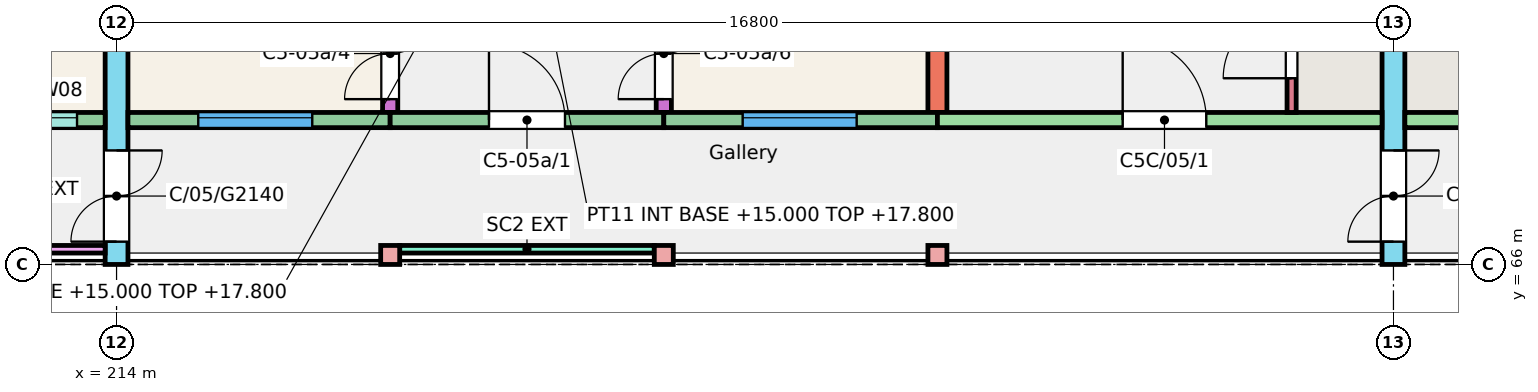
"""IFC4 building model, lengths in metres.
Left out: names, types, materials, properties, quantities, classifications, styles, units other than length and angle.
Written with IfcOpenShell. Run it as: python <this file> out.ifc"""

import sys

from ifc_helpers import new_model, si_unit, direction, frame, frame_2d, origin, origin_2d, place, context, subcontext, project, spatial, rectangle, extrude, element, fill, save


model = new_model("IFC4")
c1 = context("Model", 3, precision=1e-05, world=origin(), true_north=direction((0.0, 1.0)))
c2 = subcontext(c1, "Body", "Model", "MODEL_VIEW")
j1 = project(units=[si_unit("LENGTHUNIT", "METRE"), si_unit("PLANEANGLEUNIT", "RADIAN")], contexts=[c1])
p1 = place(None, origin())
s1 = spatial("IfcSite", under=j1, at=p1, CompositionType="ELEMENT")
p2 = place(p1, origin())
s2 = spatial("IfcBuilding", under=s1, at=p2, CompositionType="ELEMENT")
p3 = place(p2, frame((0.0, 0.0, 15.0)))
s3 = spatial("IfcBuildingStorey", under=s2, at=p3, CompositionType="ELEMENT", Elevation=15.0)
p4 = place(p3, frame((214.0, 66.0, 0.0), z_axis=(0.0, 0.0, 1.0), x_axis=(0.0, 1.0, 0.0)))
e1 = element("IfcWall", 1, at=p4, inside=s3, PredefinedType="SHEAR", context=c2, shape_type="SweptSolid", body=[
    extrude(rectangle(XDim=11.0, YDim=0.3, at=frame_2d((5.5, 0.0))), origin(), (0.0, 0.0, 1.0), 3.0),
])
p5 = place(p4, frame((0.3, 0.0, 0.0)))
e2 = element("IfcOpeningElement", 2, at=p5, cuts=e1, PredefinedType="OPENING", context=c2, shape_type="SweptSolid", body=[
    extrude(rectangle(XDim=1.2, YDim=2.1, at=frame_2d((0.6, 1.05))), frame((0.0, 0.16, 0.0), z_axis=(0.0, -1.0, 0.0), x_axis=(1.0, 0.0, 0.0)), (0.0, 0.0, 1.0), 0.32),
])
p6 = place(p3, frame((217.6, 68.0, 0.0), z_axis=(0.0, 0.0, 1.0), x_axis=(0.0, 1.0, 0.0)))
e3 = element("IfcWall", 3, at=p6, inside=s3, PredefinedType="SHEAR", context=c2, shape_type="SweptSolid", body=[
    extrude(rectangle(XDim=9.0, YDim=0.2, at=frame_2d((4.5, 0.0))), origin(), (0.0, 0.0, 1.0), 3.0),
])
p7 = place(p6, frame((0.175, 0.0, 0.0)))
e4 = element("IfcOpeningElement", 4, at=p7, cuts=e3, PredefinedType="OPENING", context=c2, shape_type="SweptSolid", body=[
    extrude(rectangle(XDim=1.2, YDim=2.1, at=frame_2d((0.6, 1.05))), frame((0.0, 0.11, 0.0), z_axis=(0.0, -1.0, 0.0), x_axis=(1.0, 0.0, 0.0)), (0.0, 0.0, 1.0), 0.22),
])
p8 = place(p6, frame((6.4, 0.0, 0.0)))
e5 = element("IfcOpeningElement", 5, at=p8, cuts=e3, PredefinedType="OPENING", context=c2, shape_type="SweptSolid", body=[
    extrude(rectangle(XDim=1.2, YDim=2.1, at=frame_2d((0.6, 1.05))), frame((0.0, 0.11, 0.0), z_axis=(0.0, -1.0, 0.0), x_axis=(1.0, 0.0, 0.0)), (0.0, 0.0, 1.0), 0.22),
])
p9 = place(p3, frame((221.2, 68.0, 0.0), z_axis=(0.0, 0.0, 1.0), x_axis=(0.0, 1.0, 0.0)))
e6 = element("IfcWall", 6, at=p9, inside=s3, PredefinedType="SHEAR", context=c2, shape_type="SweptSolid", body=[
    extrude(rectangle(XDim=9.0, YDim=0.2, at=frame_2d((4.5, 0.0))), origin(), (0.0, 0.0, 1.0), 3.0),
])
p10 = place(p9, frame((0.175, 0.0, 0.0)))
e7 = element("IfcOpeningElement", 7, at=p10, cuts=e6, PredefinedType="OPENING", context=c2, shape_type="SweptSolid", body=[
    extrude(rectangle(XDim=1.2, YDim=2.1, at=frame_2d((0.6, 1.05))), frame((0.0, 0.11, 0.0), z_axis=(0.0, -1.0, 0.0), x_axis=(1.0, 0.0, 0.0)), (0.0, 0.0, 1.0), 0.22),
])
p11 = place(p9, frame((6.4, 0.0, 0.0)))
e8 = element("IfcOpeningElement", 8, at=p11, cuts=e6, PredefinedType="OPENING", context=c2, shape_type="SweptSolid", body=[
    extrude(rectangle(XDim=1.2, YDim=2.1, at=frame_2d((0.6, 1.05))), frame((0.0, 0.11, 0.0), z_axis=(0.0, -1.0, 0.0), x_axis=(1.0, 0.0, 0.0)), (0.0, 0.0, 1.0), 0.22),
])
p12 = place(p3, frame((224.8, 68.0, 0.0), z_axis=(0.0, 0.0, 1.0), x_axis=(0.0, 1.0, 0.0)))
e9 = element("IfcWall", 9, at=p12, inside=s3, PredefinedType="SHEAR", context=c2, shape_type="SweptSolid", body=[
    extrude(rectangle(XDim=9.0, YDim=0.25, at=frame_2d((4.5, 0.0))), origin(), (0.0, 0.0, 1.0), 3.0),
])
p13 = place(p3, frame((230.8, 66.0, 0.0), z_axis=(0.0, 0.0, 1.0), x_axis=(0.0, 1.0, 0.0)))
e10 = element("IfcWall", 10, at=p13, inside=s3, PredefinedType="SHEAR", context=c2, shape_type="SweptSolid", body=[
    extrude(rectangle(XDim=11.0, YDim=0.3, at=frame_2d((5.5, 0.0))), origin(), (0.0, 0.0, 1.0), 3.0),
])
p14 = place(p13, frame((0.3, 0.0, 0.0)))
e11 = element("IfcOpeningElement", 11, at=p14, cuts=e10, PredefinedType="OPENING", context=c2, shape_type="SweptSolid", body=[
    extrude(rectangle(XDim=1.2, YDim=2.1, at=frame_2d((0.6, 1.05))), frame((0.0, 0.16, 0.0), z_axis=(0.0, -1.0, 0.0), x_axis=(1.0, 0.0, 0.0)), (0.0, 0.0, 1.0), 0.32),
])
p15 = place(p3, frame((210.4, 67.9, 0.0), z_axis=(0.0, 0.0, 1.0), x_axis=(1.0, 0.0, 0.0)))
e12 = element("IfcWall", 12, at=p15, inside=s3, PredefinedType="SOLIDWALL", context=c2, shape_type="SweptSolid", body=[
    extrude(rectangle(XDim=3.45, YDim=0.2, at=frame_2d((1.725, 0.0))), origin(), (0.0, 0.0, 1.0), 3.0),
])
p16 = place(p15, frame((1.88, 0.0, 1.1)))
e13 = element("IfcOpeningElement", 13, at=p16, cuts=e12, PredefinedType="OPENING", context=c2, shape_type="SweptSolid", body=[
    extrude(rectangle(XDim=1.2, YDim=1.3, at=frame_2d((0.6, 0.65))), frame((0.0, 0.11, 0.0), z_axis=(0.0, -1.0, 0.0), x_axis=(1.0, 0.0, 0.0)), (0.0, 0.0, 1.0), 0.22),
])
p17 = place(p15, frame((0.25, 0.0, 0.0)))
e14 = element("IfcOpeningElement", 14, at=p17, cuts=e12, PredefinedType="OPENING", context=c2, shape_type="SweptSolid", body=[
    extrude(rectangle(XDim=1.0, YDim=2.1, at=frame_2d((0.5, 1.05))), frame((0.0, 0.11, 0.0), z_axis=(0.0, -1.0, 0.0), x_axis=(1.0, 0.0, 0.0)), (0.0, 0.0, 1.0), 0.22),
])
p18 = place(p3, frame((214.15, 67.9, 0.0), z_axis=(0.0, 0.0, 1.0), x_axis=(1.0, 0.0, 0.0)))
e15 = element("IfcWall", 15, at=p18, inside=s3, PredefinedType="SOLIDWALL", context=c2, shape_type="SweptSolid", body=[
    extrude(rectangle(XDim=3.45, YDim=0.2, at=frame_2d((1.725, 0.0))), origin(), (0.0, 0.0, 1.0), 3.0),
])
p19 = place(p18, frame((0.925, 0.0, 0.9)))
e16 = element("IfcOpeningElement", 16, at=p19, cuts=e15, PredefinedType="OPENING", context=c2, shape_type="SweptSolid", body=[
    extrude(rectangle(XDim=1.5, YDim=1.5, at=frame_2d((0.75, 0.75))), frame((0.0, 0.11, 0.0), z_axis=(0.0, -1.0, 0.0), x_axis=(1.0, 0.0, 0.0)), (0.0, 0.0, 1.0), 0.22),
])
p20 = place(p3, frame((217.6, 67.9, 0.0), z_axis=(0.0, 0.0, 1.0), x_axis=(1.0, 0.0, 0.0)))
e17 = element("IfcWall", 17, at=p20, inside=s3, PredefinedType="SOLIDWALL", context=c2, shape_type="SweptSolid", body=[
    extrude(rectangle(XDim=3.6, YDim=0.2, at=frame_2d((1.8, 0.0))), origin(), (0.0, 0.0, 1.0), 3.0),
])
p21 = place(p20, frame((1.3, 0.0, 0.0)))
e18 = element("IfcOpeningElement", 18, at=p21, cuts=e17, PredefinedType="OPENING", context=c2, shape_type="SweptSolid", body=[
    extrude(rectangle(XDim=1.0, YDim=2.1, at=frame_2d((0.5, 1.05))), frame((0.0, 0.11, 0.0), z_axis=(0.0, -1.0, 0.0), x_axis=(1.0, 0.0, 0.0)), (0.0, 0.0, 1.0), 0.22),
])
p22 = place(p3, frame((221.2, 67.9, 0.0), z_axis=(0.0, 0.0, 1.0), x_axis=(1.0, 0.0, 0.0)))
e19 = element("IfcWall", 19, at=p22, inside=s3, PredefinedType="SOLIDWALL", context=c2, shape_type="SweptSolid", body=[
    extrude(rectangle(XDim=3.6, YDim=0.2, at=frame_2d((1.8, 0.0))), origin(), (0.0, 0.0, 1.0), 3.0),
])
p23 = place(p22, frame((1.038, 0.0, 0.9)))
e20 = element("IfcOpeningElement", 20, at=p23, cuts=e19, PredefinedType="OPENING", context=c2, shape_type="SweptSolid", body=[
    extrude(rectangle(XDim=1.5, YDim=1.5, at=frame_2d((0.75, 0.75))), frame((0.0, 0.11, 0.0), z_axis=(0.0, -1.0, 0.0), x_axis=(1.0, 0.0, 0.0)), (0.0, 0.0, 1.0), 0.22),
])
p24 = place(p3, frame((224.8, 67.9, 0.0), z_axis=(0.0, 0.0, 1.0), x_axis=(1.0, 0.0, 0.0)))
e21 = element("IfcWall", 21, at=p24, inside=s3, PredefinedType="SHEAR", context=c2, shape_type="SweptSolid", body=[
    extrude(rectangle(XDim=5.85, YDim=0.2, at=frame_2d((2.925, 0.0))), origin(), (0.0, 0.0, 1.0), 3.0),
])
p25 = place(p24, frame((2.438, 0.0, 0.0)))
e22 = element("IfcOpeningElement", 22, at=p25, cuts=e21, PredefinedType="OPENING", context=c2, shape_type="SweptSolid", body=[
    extrude(rectangle(XDim=1.1, YDim=2.1, at=frame_2d((0.55, 1.05))), frame((0.0, 0.11, 0.0), z_axis=(0.0, -1.0, 0.0), x_axis=(1.0, 0.0, 0.0)), (0.0, 0.0, 1.0), 0.22),
])
p26 = place(p3, frame((229.46, 68.0, 0.0), z_axis=(0.0, 0.0, 1.0), x_axis=(0.0, 1.0, 0.0)))
e23 = element("IfcWall", 23, at=p26, inside=s3, PredefinedType="SHEAR", context=c2, shape_type="SweptSolid", body=[
    extrude(rectangle(XDim=1.72, YDim=0.12, at=frame_2d((0.86, 0.0))), origin(), (0.0, 0.0, 1.0), 3.0),
])
p27 = place(p26, frame((0.45, 0.0, 0.0)))
e24 = element("IfcOpeningElement", 24, at=p27, cuts=e23, PredefinedType="OPENING", context=c2, shape_type="SweptSolid", body=[
    extrude(rectangle(XDim=0.9, YDim=2.1, at=frame_2d((0.45, 1.05))), frame((0.0, 0.07, 0.0), z_axis=(0.0, -1.0, 0.0), x_axis=(1.0, 0.0, 0.0)), (0.0, 0.0, 1.0), 0.14),
])
p28 = place(p3, frame((230.95, 67.9, 0.0), z_axis=(0.0, 0.0, 1.0), x_axis=(1.0, 0.0, 0.0)))
e25 = element("IfcWall", 25, at=p28, inside=s3, PredefinedType="SHEAR", context=c2, shape_type="SweptSolid", body=[
    extrude(rectangle(XDim=5.85, YDim=0.2, at=frame_2d((2.925, 0.0))), origin(), (0.0, 0.0, 1.0), 3.0),
])
p29 = place(p28, frame((2.312, 0.0, 0.0)))
e26 = element("IfcOpeningElement", 26, at=p29, cuts=e25, PredefinedType="OPENING", context=c2, shape_type="SweptSolid", body=[
    extrude(rectangle(XDim=1.1, YDim=2.1, at=frame_2d((0.55, 1.05))), frame((0.0, 0.11, 0.0), z_axis=(0.0, -1.0, 0.0), x_axis=(1.0, 0.0, 0.0)), (0.0, 0.0, 1.0), 0.22),
])
for number, where, z_axis, x_axis in (
    (27, (217.6, 66.125, 0.0), (0.0, 0.0, 1.0), (1.0, 0.0, 0.0)),
    (28, (221.2, 66.125, 0.0), (0.0, 0.0, 1.0), (1.0, 0.0, 0.0)),
    (29, (224.8, 66.125, 0.0), (0.0, 0.0, 1.0), (1.0, 0.0, 0.0)),
):
    element("IfcColumn", number, at=place(p3, frame(where, z_axis=z_axis, x_axis=x_axis)), inside=s3, PredefinedType="COLUMN", context=c2, shape_type="SweptSolid", body=[
        extrude(rectangle(XDim=0.25, YDim=0.25, at=origin_2d()), origin(), (0.0, 0.0, 1.0), 3.0),
    ])
p30 = place(p3, frame((210.525, 66.2, 0.0), z_axis=(0.0, 0.0, 1.0), x_axis=(1.0, 0.0, 0.0)))
e30 = element("IfcWall", 30, at=p30, inside=s3, PredefinedType="SOLIDWALL", context=c2, shape_type="SweptSolid", body=[
    extrude(rectangle(XDim=3.325, YDim=0.1, at=frame_2d((1.663, 0.0))), origin(), (0.0, 0.0, 1.0), 2.45),
])
p31 = place(p3, frame((217.725, 66.2, 0.0), z_axis=(0.0, 0.0, 1.0), x_axis=(1.0, 0.0, 0.0)))
e31 = element("IfcWall", 31, at=p31, inside=s3, PredefinedType="SOLIDWALL", context=c2, shape_type="SweptSolid", body=[
    extrude(rectangle(XDim=3.35, YDim=0.1, at=frame_2d((1.675, 0.0))), origin(), (0.0, 0.0, 1.0), 2.45),
])
p32 = place(p16, origin())
e32 = element("IfcWindow", 32, at=p32, inside=s3, PartitioningType="SINGLE_PANEL", PredefinedType="WINDOW", context=c2, shape_type="SweptSolid", body=[
    extrude(rectangle(XDim=1.2, YDim=1.3, at=frame_2d((0.6, 0.65))), frame((0.0, 0.06, 0.0), z_axis=(0.0, -1.0, 0.0), x_axis=(1.0, 0.0, 0.0)), (0.0, 0.0, 1.0), 0.06),
])
fill(e13, e32)
p33 = place(p19, origin())
e33 = element("IfcWindow", 33, at=p33, inside=s3, PartitioningType="SINGLE_PANEL", PredefinedType="WINDOW", context=c2, shape_type="SweptSolid", body=[
    extrude(rectangle(XDim=1.5, YDim=1.5, at=frame_2d((0.75, 0.75))), frame((0.0, 0.06, 0.0), z_axis=(0.0, -1.0, 0.0), x_axis=(1.0, 0.0, 0.0)), (0.0, 0.0, 1.0), 0.06),
])
fill(e16, e33)
p34 = place(p23, origin())
e34 = element("IfcWindow", 34, at=p34, inside=s3, PartitioningType="SINGLE_PANEL", PredefinedType="WINDOW", context=c2, shape_type="SweptSolid", body=[
    extrude(rectangle(XDim=1.5, YDim=1.5, at=frame_2d((0.75, 0.75))), frame((0.0, 0.06, 0.0), z_axis=(0.0, -1.0, 0.0), x_axis=(1.0, 0.0, 0.0)), (0.0, 0.0, 1.0), 0.06),
])
fill(e20, e34)
p35 = place(p21, origin())
e35 = element("IfcDoor", 35, at=p35, inside=s3, OperationType="SINGLE_SWING_LEFT", PredefinedType="DOOR", context=c2, shape_type="SweptSolid", body=[
    extrude(rectangle(XDim=1.0, YDim=2.1, at=frame_2d((0.5, 1.05))), frame((0.0, 0.025, 0.0), z_axis=(0.0, -1.0, 0.0), x_axis=(1.0, 0.0, 0.0)), (0.0, 0.0, 1.0), 0.05),
])
fill(e18, e35)
p36 = place(p7, origin())
e36 = element("IfcDoor", 36, at=p36, inside=s3, OperationType="DOUBLE_DOOR_SINGLE_SWING", PredefinedType="DOOR", context=c2, shape_type="SweptSolid", body=[
    extrude(rectangle(XDim=1.2, YDim=2.1, at=frame_2d((0.6, 1.05))), frame((0.0, 0.025, 0.0), z_axis=(0.0, -1.0, 0.0), x_axis=(1.0, 0.0, 0.0)), (0.0, 0.0, 1.0), 0.05),
])
fill(e4, e36)
p37 = place(p10, origin())
e37 = element("IfcDoor", 37, at=p37, inside=s3, OperationType="DOUBLE_DOOR_SINGLE_SWING", PredefinedType="DOOR", context=c2, shape_type="SweptSolid", body=[
    extrude(rectangle(XDim=1.2, YDim=2.1, at=frame_2d((0.6, 1.05))), frame((0.0, 0.025, 0.0), z_axis=(0.0, -1.0, 0.0), x_axis=(1.0, 0.0, 0.0)), (0.0, 0.0, 1.0), 0.05),
])
fill(e7, e37)
p38 = place(p25, origin())
e38 = element("IfcDoor", 38, at=p38, inside=s3, OperationType="SINGLE_SWING_LEFT", PredefinedType="DOOR", context=c2, shape_type="SweptSolid", body=[
    extrude(rectangle(XDim=1.1, YDim=2.1, at=frame_2d((0.55, 1.05))), frame((0.0, 0.025, 0.0), z_axis=(0.0, -1.0, 0.0), x_axis=(1.0, 0.0, 0.0)), (0.0, 0.0, 1.0), 0.05),
])
fill(e22, e38)
p39 = place(p27, origin())
e39 = element("IfcDoor", 39, at=p39, inside=s3, OperationType="SINGLE_SWING_LEFT", PredefinedType="DOOR", context=c2, shape_type="SweptSolid", body=[
    extrude(rectangle(XDim=0.9, YDim=2.1, at=frame_2d((0.45, 1.05))), frame((0.0, 0.025, 0.0), z_axis=(0.0, -1.0, 0.0), x_axis=(1.0, 0.0, 0.0)), (0.0, 0.0, 1.0), 0.05),
])
fill(e24, e39)
p40 = place(p5, origin())
e40 = element("IfcDoor", 40, at=p40, inside=s3, OperationType="DOUBLE_DOOR_SINGLE_SWING", PredefinedType="DOOR", context=c2, shape_type="SweptSolid", body=[
    extrude(rectangle(XDim=1.2, YDim=2.1, at=frame_2d((0.6, 1.05))), frame((0.0, 0.025, 0.0), z_axis=(0.0, -1.0, 0.0), x_axis=(1.0, 0.0, 0.0)), (0.0, 0.0, 1.0), 0.05),
])
fill(e2, e40)
p41 = place(p14, origin())
e41 = element("IfcDoor", 41, at=p41, inside=s3, OperationType="DOUBLE_DOOR_SINGLE_SWING", PredefinedType="DOOR", context=c2, shape_type="SweptSolid", body=[
    extrude(rectangle(XDim=1.2, YDim=2.1, at=frame_2d((0.6, 1.05))), frame((0.0, 0.025, 0.0), z_axis=(0.0, -1.0, 0.0), x_axis=(1.0, 0.0, 0.0)), (0.0, 0.0, 1.0), 0.05),
])
fill(e11, e41)
save(model, sys.argv[1])
